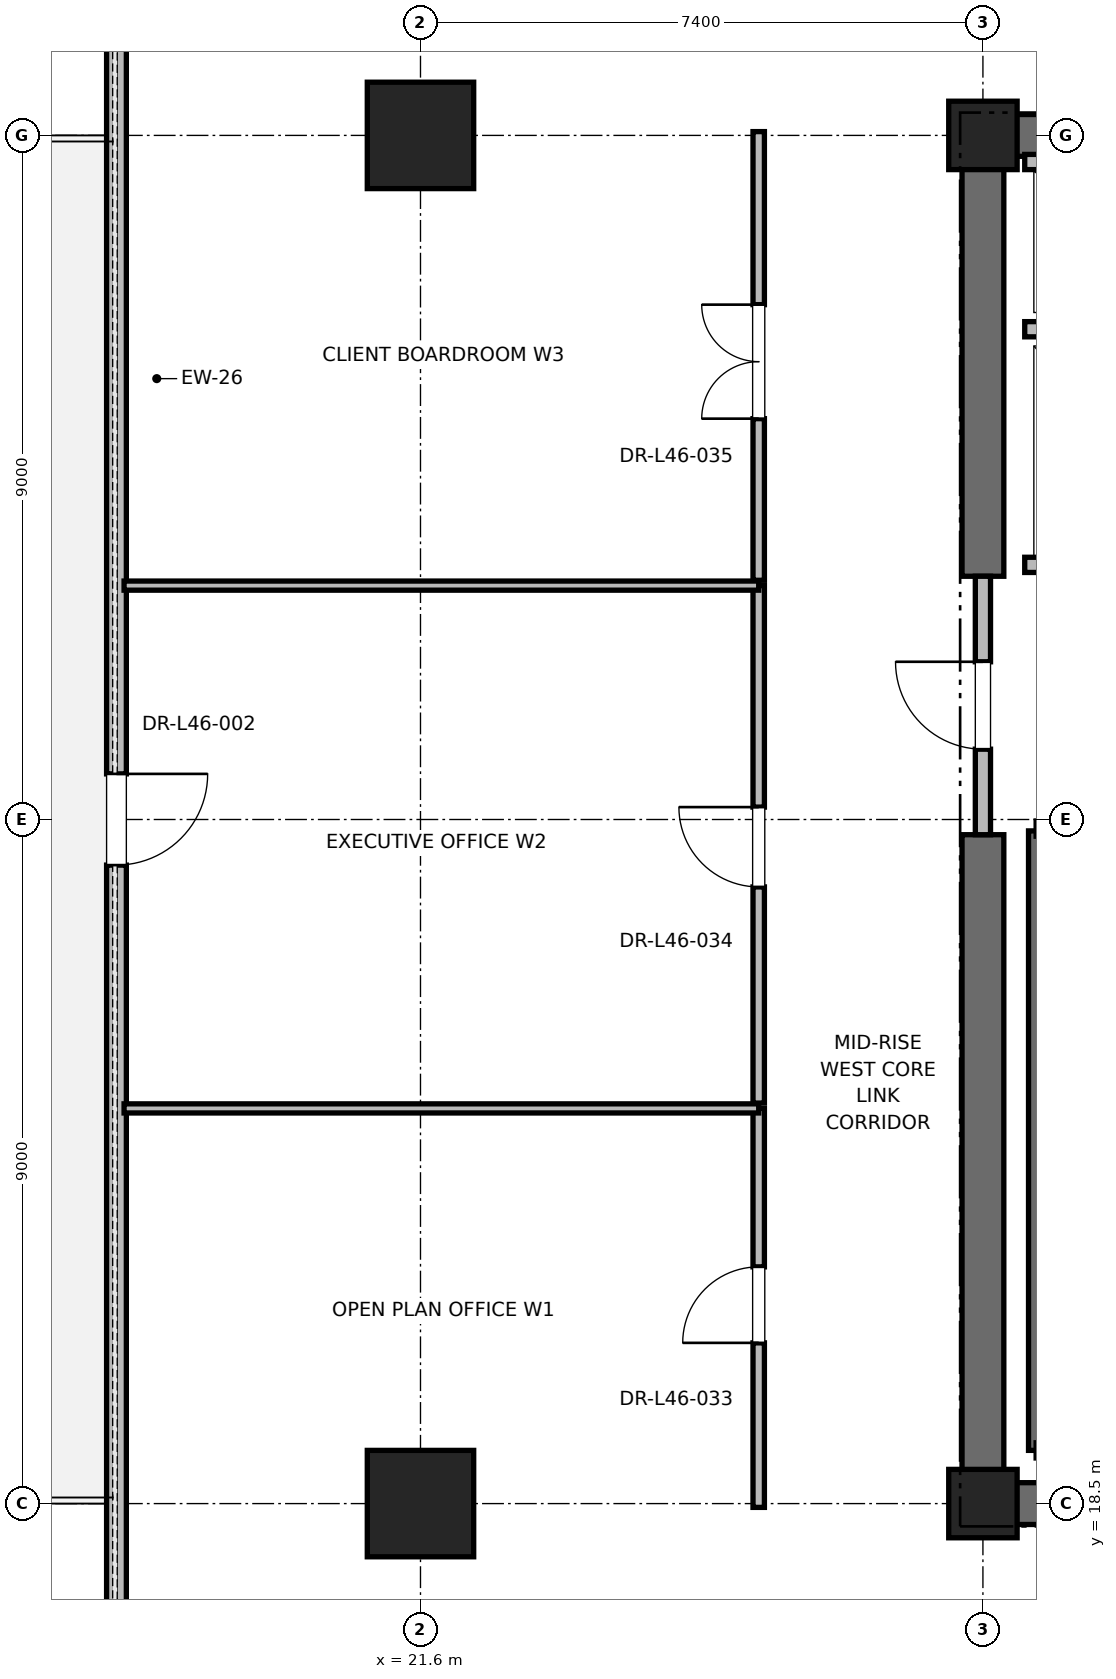
"""IFC4 building model, lengths in metres.
Left out: names, types, materials, properties, quantities, classifications, styles, units other than length and angle.
Written with IfcOpenShell. Run it as: python <this file> out.ifc"""

import sys

from ifc_helpers import new_model, si_unit, direction, frame, frame_2d, origin, origin_2d, place, context, subcontext, project, spatial, rectangle, extrude, element, fill, save


model = new_model("IFC4")
c1 = context("Model", 3, precision=1e-05, world=origin(), true_north=direction((0.0, 1.0)))
c2 = subcontext(c1, "Body", "Model", "MODEL_VIEW")
j1 = project(units=[si_unit("LENGTHUNIT", "METRE"), si_unit("PLANEANGLEUNIT", "RADIAN")], contexts=[c1])
p1 = place(None, origin())
s1 = spatial("IfcSite", under=j1, at=p1, CompositionType="ELEMENT")
p2 = place(p1, origin())
s2 = spatial("IfcBuilding", under=s1, at=p2, CompositionType="ELEMENT")
p3 = place(p2, frame((0.0, 0.0, 200.2)))
s3 = spatial("IfcBuildingStorey", under=s2, at=p3, CompositionType="ELEMENT", Elevation=200.2)
for number, where, z_axis, x_axis in (
    (1, (21.6, 18.5, 0.0), (0.0, 0.0, 1.0), (1.0, 0.0, 0.0)),
    (2, (21.6, 36.5, 0.0), (0.0, 0.0, 1.0), (1.0, 0.0, 0.0)),
):
    element("IfcColumn", number, at=place(p3, frame(where, z_axis=z_axis, x_axis=x_axis)), inside=s3, PredefinedType="COLUMN", context=c2, shape_type="SweptSolid", body=[
        extrude(rectangle(XDim=1.4, YDim=1.4, at=origin_2d()), origin(), (0.0, 0.0, 1.0), 5.0),
    ])
for number, where, z_axis, x_axis in (
    (3, (29.0, 18.5, 0.0), (0.0, 0.0, 1.0), (1.0, 0.0, 0.0)),
    (4, (29.0, 36.5, 0.0), (0.0, 0.0, 1.0), (1.0, 0.0, 0.0)),
):
    element("IfcColumn", number, at=place(p3, frame(where, z_axis=z_axis, x_axis=x_axis)), inside=s3, PredefinedType="PILASTER", context=c2, shape_type="SweptSolid", body=[
        extrude(rectangle(XDim=0.9, YDim=0.9, at=origin_2d()), origin(), (0.0, 0.0, 1.0), 5.0),
    ])
p4 = place(p3, frame((29.0, 18.5, 0.0), z_axis=(0.0, 0.0, 1.0), x_axis=(1.0, 0.0, 0.0)))
e5 = element("IfcWall", 5, at=p4, inside=s3, PredefinedType="SHEAR", context=c2, shape_type="SweptSolid", body=[
    extrude(rectangle(XDim=9.2, YDim=0.55, at=frame_2d((4.6, 0.0))), origin(), (0.0, 0.0, 1.0), 4.775),
])
p5 = place(p3, frame((29.0, 36.5, 0.0), z_axis=(0.0, 0.0, 1.0), x_axis=(1.0, 0.0, 0.0)))
e6 = element("IfcWall", 6, at=p5, inside=s3, PredefinedType="SHEAR", context=c2, shape_type="SweptSolid", body=[
    extrude(rectangle(XDim=5.8, YDim=0.55, at=frame_2d((2.9, 0.0))), origin(), (0.0, 0.0, 1.0), 4.775),
])
p6 = place(p3, frame((29.0, 18.5, 0.0), z_axis=(0.0, 0.0, 1.0), x_axis=(0.0, 1.0, 0.0)))
e7 = element("IfcWall", 7, at=p6, inside=s3, PredefinedType="SHEAR", context=c2, shape_type="SweptSolid", body=[
    extrude(rectangle(XDim=8.8, YDim=0.55, at=frame_2d((4.4, 0.0))), origin(), (0.0, 0.0, 1.0), 4.775),
])
p7 = place(p3, frame((29.0, 30.7, 0.0), z_axis=(0.0, 0.0, 1.0), x_axis=(0.0, 1.0, 0.0)))
e8 = element("IfcWall", 8, at=p7, inside=s3, PredefinedType="SHEAR", context=c2, shape_type="SweptSolid", body=[
    extrude(rectangle(XDim=5.8, YDim=0.55, at=frame_2d((2.9, 0.0))), origin(), (0.0, 0.0, 1.0), 4.775),
])
p8 = place(p3, frame((17.6, 44.7, 0.0), z_axis=(0.0, 0.0, 1.0), x_axis=(0.0, -1.0, 0.0)))
e9 = element("IfcWall", 9, at=p8, inside=s3, PredefinedType="PARAPET", context=c2, shape_type="SweptSolid", body=[
    extrude(rectangle(XDim=34.4, YDim=0.26, at=frame_2d((17.2, 0.0))), origin(), (0.0, 0.0, 1.0), 4.047),
])
p9 = place(p8, frame((4.2, 0.0, 0.85)))
e10 = element("IfcOpeningElement", 10, at=p9, cuts=e9, PredefinedType="OPENING", context=c2, shape_type="SweptSolid", body=[
    extrude(rectangle(XDim=2.0, YDim=2.3, at=frame_2d((1.0, 1.15))), frame((0.0, 0.13, 0.0), z_axis=(0.0, -1.0, 0.0), x_axis=(1.0, 0.0, 0.0)), (0.0, 0.0, 1.0), 0.26),
])
p10 = place(p8, frame((16.6, 0.0, 0.0)))
e11 = element("IfcOpeningElement", 11, at=p10, cuts=e9, PredefinedType="OPENING", context=c2, shape_type="SweptSolid", body=[
    extrude(rectangle(XDim=1.2, YDim=2.2, at=frame_2d((0.6, 1.1))), frame((0.0, 0.13, 0.0), z_axis=(0.0, -1.0, 0.0), x_axis=(1.0, 0.0, 0.0)), (0.0, 0.0, 1.0), 0.26),
])
p11 = place(p8, frame((28.2, 0.0, 0.85)))
e12 = element("IfcOpeningElement", 12, at=p11, cuts=e9, PredefinedType="OPENING", context=c2, shape_type="SweptSolid", body=[
    extrude(rectangle(XDim=2.0, YDim=2.3, at=frame_2d((1.0, 1.15))), frame((0.0, 0.13, 0.0), z_axis=(0.0, -1.0, 0.0), x_axis=(1.0, 0.0, 0.0)), (0.0, 0.0, 1.0), 0.26),
])
p12 = place(p3, frame((29.7, 19.2, 0.0), z_axis=(0.0, 0.0, 1.0), x_axis=(0.0, 1.0, 0.0)))
e13 = element("IfcWall", 13, at=p12, inside=s3, PredefinedType="SOLIDWALL", context=c2, shape_type="SweptSolid", body=[
    extrude(rectangle(XDim=8.15, YDim=0.2, at=frame_2d((4.075, 0.0))), origin(), (0.0, 0.0, 1.0), 4.775),
])
p13 = place(p3, frame((29.0, 27.3, 0.0), z_axis=(0.0, 0.0, 1.0), x_axis=(0.0, 1.0, 0.0)))
e14 = element("IfcWall", 14, at=p13, inside=s3, PredefinedType="PARTITIONING", context=c2, shape_type="SweptSolid", body=[
    extrude(rectangle(XDim=3.4, YDim=0.2, at=frame_2d((1.7, 0.0))), origin(), (0.0, 0.0, 1.0), 3.755),
])
p14 = place(p13, frame((1.125, 0.0, 0.0)))
e15 = element("IfcOpeningElement", 15, at=p14, cuts=e14, PredefinedType="OPENING", context=c2, shape_type="SweptSolid", body=[
    extrude(rectangle(XDim=1.15, YDim=2.2, at=frame_2d((0.575, 1.1))), frame((0.0, 0.1, 0.0), z_axis=(0.0, -1.0, 0.0), x_axis=(1.0, 0.0, 0.0)), (0.0, 0.0, 1.0), 0.2),
])
p15 = place(p3, frame((29.55, 30.85, 0.0), z_axis=(0.0, 0.0, 1.0), x_axis=(1.0, 0.0, 0.0)))
e16 = element("IfcWall", 16, at=p15, inside=s3, PredefinedType="SOLIDWALL", context=c2, shape_type="SweptSolid", body=[
    extrude(rectangle(XDim=2.6, YDim=0.2, at=frame_2d((1.3, 0.0))), origin(), (0.0, 0.0, 1.0), 3.755),
])
p16 = place(p15, frame((0.75, 0.0, 0.0)))
e17 = element("IfcOpeningElement", 17, at=p16, cuts=e16, PredefinedType="OPENING", context=c2, shape_type="SweptSolid", body=[
    extrude(rectangle(XDim=1.1, YDim=2.2, at=frame_2d((0.55, 1.1))), frame((0.0, 0.1, 0.0), z_axis=(0.0, -1.0, 0.0), x_axis=(1.0, 0.0, 0.0)), (0.0, 0.0, 1.0), 0.2),
])
p17 = place(p3, frame((29.55, 33.95, 0.0), z_axis=(0.0, 0.0, 1.0), x_axis=(1.0, 0.0, 0.0)))
e18 = element("IfcWall", 18, at=p17, inside=s3, PredefinedType="SOLIDWALL", context=c2, shape_type="SweptSolid", body=[
    extrude(rectangle(XDim=2.8, YDim=0.2, at=frame_2d((1.4, 0.0))), origin(), (0.0, 0.0, 1.0), 4.775),
])
p18 = place(p3, frame((32.35, 36.15, 0.0), z_axis=(0.0, 0.0, 1.0), x_axis=(-1.0, 0.0, 0.0)))
e19 = element("IfcWall", 19, at=p18, inside=s3, PredefinedType="SOLIDWALL", context=c2, shape_type="SweptSolid", body=[
    extrude(rectangle(XDim=2.8, YDim=0.2, at=frame_2d((1.4, 0.0))), origin(), (0.0, 0.0, 1.0), 4.062),
])
p19 = place(p3, frame((26.05, 18.45, 0.0), z_axis=(0.0, 0.0, 1.0), x_axis=(0.0, 1.0, 0.0)))
e20 = element("IfcWall", 20, at=p19, inside=s3, PredefinedType="PARTITIONING", context=c2, shape_type="SweptSolid", body=[
    extrude(rectangle(XDim=5.249, YDim=0.15, at=frame_2d((2.625, 0.0))), origin(), (0.0, 0.0, 1.0), 2.85),
])
p20 = place(p19, frame((2.165, 0.0, 0.0)))
e21 = element("IfcOpeningElement", 21, at=p20, cuts=e20, PredefinedType="OPENING", context=c2, shape_type="SweptSolid", body=[
    extrude(rectangle(XDim=1.0, YDim=2.15, at=frame_2d((0.5, 1.075))), frame((0.0, 0.075, 0.0), z_axis=(0.0, -1.0, 0.0), x_axis=(1.0, 0.0, 0.0)), (0.0, 0.0, 1.0), 0.15),
])
p21 = place(p3, frame((17.7, 23.699, 0.0), z_axis=(0.0, 0.0, 1.0), x_axis=(1.0, 0.0, 0.0)))
e22 = element("IfcWall", 22, at=p21, inside=s3, PredefinedType="PARTITIONING", context=c2, shape_type="SweptSolid", body=[
    extrude(rectangle(XDim=8.35, YDim=0.12, at=frame_2d((4.175, 0.0))), origin(), (0.0, 0.0, 1.0), 2.85),
])
p22 = place(p3, frame((26.05, 23.769, 0.0), z_axis=(0.0, 0.0, 1.0), x_axis=(0.0, 1.0, 0.0)))
e23 = element("IfcWall", 23, at=p22, inside=s3, PredefinedType="PARTITIONING", context=c2, shape_type="SweptSolid", body=[
    extrude(rectangle(XDim=6.808, YDim=0.15, at=frame_2d((3.404, 0.0))), origin(), (0.0, 0.0, 1.0), 2.85),
])
p23 = place(p22, frame((2.844, 0.0, 0.0)))
e24 = element("IfcOpeningElement", 24, at=p23, cuts=e23, PredefinedType="OPENING", context=c2, shape_type="SweptSolid", body=[
    extrude(rectangle(XDim=1.05, YDim=2.2, at=frame_2d((0.525, 1.1))), frame((0.0, 0.075, 0.0), z_axis=(0.0, -1.0, 0.0), x_axis=(1.0, 0.0, 0.0)), (0.0, 0.0, 1.0), 0.15),
])
p24 = place(p3, frame((17.7, 30.577, 0.0), z_axis=(0.0, 0.0, 1.0), x_axis=(1.0, 0.0, 0.0)))
e25 = element("IfcWall", 25, at=p24, inside=s3, PredefinedType="PARTITIONING", context=c2, shape_type="SweptSolid", body=[
    extrude(rectangle(XDim=8.35, YDim=0.12, at=frame_2d((4.175, 0.0))), origin(), (0.0, 0.0, 1.0), 2.85),
])
p25 = place(p3, frame((26.05, 30.647, 0.0), z_axis=(0.0, 0.0, 1.0), x_axis=(0.0, 1.0, 0.0)))
e26 = element("IfcWall", 26, at=p25, inside=s3, PredefinedType="PARTITIONING", context=c2, shape_type="SweptSolid", body=[
    extrude(rectangle(XDim=5.903, YDim=0.15, at=frame_2d((2.952, 0.0))), origin(), (0.0, 0.0, 1.0), 2.85),
])
p26 = place(p25, frame((2.126, 0.0, 0.0)))
e27 = element("IfcOpeningElement", 27, at=p26, cuts=e26, PredefinedType="OPENING", context=c2, shape_type="SweptSolid", body=[
    extrude(rectangle(XDim=1.5, YDim=2.25, at=frame_2d((0.75, 1.125))), frame((0.0, 0.075, 0.0), z_axis=(0.0, -1.0, 0.0), x_axis=(1.0, 0.0, 0.0)), (0.0, 0.0, 1.0), 0.15),
])
p27 = place(p10, origin())
e28 = element("IfcDoor", 28, at=p27, inside=s3, OperationType="SINGLE_SWING_LEFT", PredefinedType="DOOR", context=c2, shape_type="SweptSolid", body=[
    extrude(rectangle(XDim=1.2, YDim=2.2, at=frame_2d((0.6, 1.1))), frame((0.0, 0.025, 0.0), z_axis=(0.0, -1.0, 0.0), x_axis=(1.0, 0.0, 0.0)), (0.0, 0.0, 1.0), 0.05),
])
fill(e11, e28)
p28 = place(p14, origin())
e29 = element("IfcDoor", 29, at=p28, inside=s3, OperationType="SINGLE_SWING_RIGHT", PredefinedType="DOOR", context=c2, shape_type="SweptSolid", body=[
    extrude(rectangle(XDim=1.15, YDim=2.2, at=frame_2d((0.575, 1.1))), frame((0.0, 0.025, 0.0), z_axis=(0.0, -1.0, 0.0), x_axis=(1.0, 0.0, 0.0)), (0.0, 0.0, 1.0), 0.05),
])
fill(e15, e29)
p29 = place(p20, origin())
e30 = element("IfcDoor", 30, at=p29, inside=s3, OperationType="SINGLE_SWING_LEFT", PredefinedType="DOOR", context=c2, shape_type="SweptSolid", body=[
    extrude(rectangle(XDim=1.0, YDim=2.15, at=frame_2d((0.5, 1.075))), frame((0.0, 0.025, 0.0), z_axis=(0.0, -1.0, 0.0), x_axis=(1.0, 0.0, 0.0)), (0.0, 0.0, 1.0), 0.05),
])
fill(e21, e30)
p30 = place(p23, origin())
e31 = element("IfcDoor", 31, at=p30, inside=s3, OperationType="SINGLE_SWING_RIGHT", PredefinedType="DOOR", context=c2, shape_type="SweptSolid", body=[
    extrude(rectangle(XDim=1.05, YDim=2.2, at=frame_2d((0.525, 1.1))), frame((0.0, 0.025, 0.0), z_axis=(0.0, -1.0, 0.0), x_axis=(1.0, 0.0, 0.0)), (0.0, 0.0, 1.0), 0.05),
])
fill(e24, e31)
p31 = place(p26, origin())
e32 = element("IfcDoor", 32, at=p31, inside=s3, OperationType="DOUBLE_DOOR_SINGLE_SWING", PredefinedType="DOOR", context=c2, shape_type="SweptSolid", body=[
    extrude(rectangle(XDim=1.5, YDim=2.25, at=frame_2d((0.75, 1.125))), frame((0.0, 0.025, 0.0), z_axis=(0.0, -1.0, 0.0), x_axis=(1.0, 0.0, 0.0)), (0.0, 0.0, 1.0), 0.05),
])
fill(e27, e32)
save(model, sys.argv[1])
